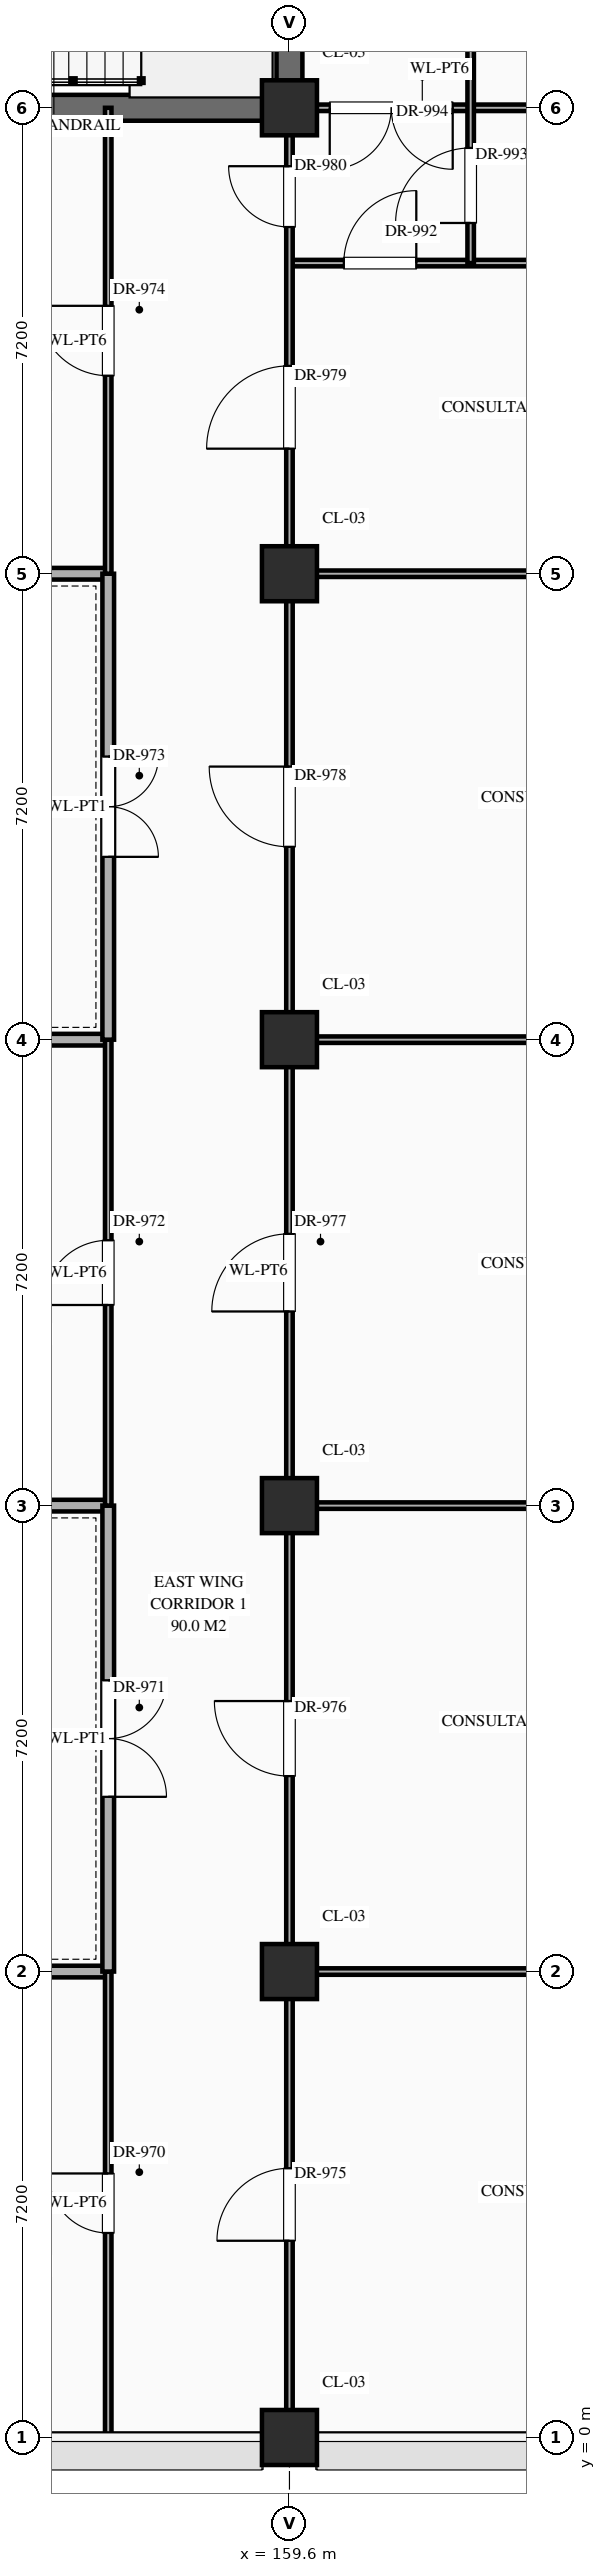
"""IFC4 building model, lengths in metres.
Left out: names, types, materials, properties, quantities, classifications, styles, units other than length and angle.
Written with IfcOpenShell. Run it as: python <this file> out.ifc"""

import sys

from ifc_helpers import new_model, si_unit, direction, frame, frame_2d, origin, origin_2d, place, context, subcontext, project, spatial, rectangle, extrude, element, fill, save


model = new_model("IFC4")
c1 = context("Model", 3, precision=1e-05, world=origin(), true_north=direction((0.0, 1.0)))
c2 = subcontext(c1, "Body", "Model", "MODEL_VIEW")
j1 = project(units=[si_unit("LENGTHUNIT", "METRE"), si_unit("PLANEANGLEUNIT", "RADIAN")], contexts=[c1])
p1 = place(None, origin())
s1 = spatial("IfcSite", under=j1, at=p1, CompositionType="ELEMENT")
p2 = place(p1, origin())
s2 = spatial("IfcBuilding", under=s1, at=p2, CompositionType="ELEMENT")
p3 = place(p2, origin())
s3 = spatial("IfcBuildingStorey", under=s2, at=p3, CompositionType="ELEMENT", Elevation=0.0)
for number, where, z_axis, x_axis in (
    (1, (159.6, 0.0, 0.0), (0.0, 0.0, 1.0), (1.0, 0.0, 0.0)),
    (2, (159.6, 7.2, 0.0), (0.0, 0.0, 1.0), (1.0, 0.0, 0.0)),
    (3, (159.6, 14.4, 0.0), (0.0, 0.0, 1.0), (1.0, 0.0, 0.0)),
    (4, (159.6, 21.6, 0.0), (0.0, 0.0, 1.0), (1.0, 0.0, 0.0)),
    (5, (159.6, 28.8, 0.0), (0.0, 0.0, 1.0), (1.0, 0.0, 0.0)),
    (6, (159.6, 36.0, 0.0), (0.0, 0.0, 1.0), (1.0, 0.0, 0.0)),
):
    element("IfcColumn", number, at=place(p3, frame(where, z_axis=z_axis, x_axis=x_axis)), inside=s3, PredefinedType="COLUMN", context=c2, shape_type="SweptSolid", body=[
        extrude(rectangle(XDim=0.85, YDim=0.85, at=origin_2d()), origin(), (0.0, 0.0, 1.0), 5.4),
    ])
p4 = place(p3, frame((151.24, 7.2, 0.0), z_axis=(0.0, 0.0, 1.0), x_axis=(1.0, 0.0, 0.0)))
e7 = element("IfcWall", 7, at=p4, inside=s3, PredefinedType="STANDARD", context=c2, shape_type="SweptSolid", body=[
    extrude(rectangle(XDim=5.56, YDim=0.18, at=frame_2d((2.78, 0.0))), origin(), (0.0, 0.0, 1.0), 4.27),
])
p5 = place(p3, frame((159.6, 7.2, 0.0), z_axis=(0.0, 0.0, 1.0), x_axis=(1.0, 0.0, 0.0)))
e8 = element("IfcWall", 8, at=p5, inside=s3, PredefinedType="STANDARD", context=c2, shape_type="SweptSolid", body=[
    extrude(rectangle(XDim=8.36, YDim=0.1, at=frame_2d((4.18, 0.0))), origin(), (0.0, 0.0, 1.0), 4.27),
])
p6 = place(p3, frame((151.24, 14.4, 0.0), z_axis=(0.0, 0.0, 1.0), x_axis=(1.0, 0.0, 0.0)))
e9 = element("IfcWall", 9, at=p6, inside=s3, PredefinedType="STANDARD", context=c2, shape_type="SweptSolid", body=[
    extrude(rectangle(XDim=5.56, YDim=0.18, at=frame_2d((2.78, 0.0))), origin(), (0.0, 0.0, 1.0), 4.27),
])
p7 = place(p3, frame((159.6, 14.4, 0.0), z_axis=(0.0, 0.0, 1.0), x_axis=(1.0, 0.0, 0.0)))
e10 = element("IfcWall", 10, at=p7, inside=s3, PredefinedType="STANDARD", context=c2, shape_type="SweptSolid", body=[
    extrude(rectangle(XDim=8.36, YDim=0.1, at=frame_2d((4.18, 0.0))), origin(), (0.0, 0.0, 1.0), 4.27),
])
p8 = place(p3, frame((151.24, 21.6, 0.0), z_axis=(0.0, 0.0, 1.0), x_axis=(1.0, 0.0, 0.0)))
e11 = element("IfcWall", 11, at=p8, inside=s3, PredefinedType="STANDARD", context=c2, shape_type="SweptSolid", body=[
    extrude(rectangle(XDim=5.56, YDim=0.18, at=frame_2d((2.78, 0.0))), origin(), (0.0, 0.0, 1.0), 4.27),
])
p9 = place(p3, frame((159.6, 21.6, 0.0), z_axis=(0.0, 0.0, 1.0), x_axis=(1.0, 0.0, 0.0)))
e12 = element("IfcWall", 12, at=p9, inside=s3, PredefinedType="STANDARD", context=c2, shape_type="SweptSolid", body=[
    extrude(rectangle(XDim=8.36, YDim=0.1, at=frame_2d((4.18, 0.0))), origin(), (0.0, 0.0, 1.0), 4.27),
])
p10 = place(p3, frame((151.24, 28.8, 0.0), z_axis=(0.0, 0.0, 1.0), x_axis=(1.0, 0.0, 0.0)))
e13 = element("IfcWall", 13, at=p10, inside=s3, PredefinedType="STANDARD", context=c2, shape_type="SweptSolid", body=[
    extrude(rectangle(XDim=5.56, YDim=0.18, at=frame_2d((2.78, 0.0))), origin(), (0.0, 0.0, 1.0), 4.27),
])
p11 = place(p3, frame((159.6, 28.8, 0.0), z_axis=(0.0, 0.0, 1.0), x_axis=(1.0, 0.0, 0.0)))
e14 = element("IfcWall", 14, at=p11, inside=s3, PredefinedType="STANDARD", context=c2, shape_type="SweptSolid", body=[
    extrude(rectangle(XDim=8.36, YDim=0.1, at=frame_2d((4.18, 0.0))), origin(), (0.0, 0.0, 1.0), 4.27),
])
p12 = place(p3, frame((159.6, 33.6, 0.0), z_axis=(0.0, 0.0, 1.0), x_axis=(1.0, 0.0, 0.0)))
e15 = element("IfcWall", 15, at=p12, inside=s3, PredefinedType="STANDARD", context=c2, shape_type="SweptSolid", body=[
    extrude(rectangle(XDim=8.36, YDim=0.1, at=frame_2d((4.18, 0.0))), origin(), (0.0, 0.0, 1.0), 5.12),
])
p13 = place(p12, frame((0.84, 0.0, 0.0)))
e16 = element("IfcOpeningElement", 16, at=p13, cuts=e15, PredefinedType="OPENING", context=c2, shape_type="SweptSolid", body=[
    extrude(rectangle(XDim=1.12, YDim=2.25, at=frame_2d((0.56, 1.125))), frame((0.0, 0.062, 0.0), z_axis=(0.0, -1.0, 0.0), x_axis=(1.0, 0.0, 0.0)), (0.0, 0.0, 1.0), 0.124),
])
p14 = place(p3, frame((151.24, 36.0, 0.0), z_axis=(0.0, 0.0, 1.0), x_axis=(1.0, 0.0, 0.0)))
e17 = element("IfcWall", 17, at=p14, inside=s3, PredefinedType="SHEAR", context=c2, shape_type="SweptSolid", body=[
    extrude(rectangle(XDim=8.36, YDim=0.4, at=frame_2d((4.18, 0.0))), origin(), (0.0, 0.0, 1.0), 5.12),
])
p15 = place(p3, frame((159.6, 36.0, 0.0), z_axis=(0.0, 0.0, 1.0), x_axis=(1.0, 0.0, 0.0)))
e18 = element("IfcWall", 18, at=p15, inside=s3, PredefinedType="STANDARD", context=c2, shape_type="SweptSolid", body=[
    extrude(rectangle(XDim=8.36, YDim=0.1, at=frame_2d((4.18, 0.0))), origin(), (0.0, 0.0, 1.0), 4.27),
])
p16 = place(p15, frame((0.623, 0.0, 0.0)))
e19 = element("IfcOpeningElement", 19, at=p16, cuts=e18, PredefinedType="OPENING", context=c2, shape_type="SweptSolid", body=[
    extrude(rectangle(XDim=1.9, YDim=2.5, at=frame_2d((0.95, 1.25))), frame((0.0, 0.062, 0.0), z_axis=(0.0, -1.0, 0.0), x_axis=(1.0, 0.0, 0.0)), (0.0, 0.0, 1.0), 0.124),
])
p17 = place(p3, frame((156.8, 0.04, 0.0), z_axis=(0.0, 0.0, 1.0), x_axis=(0.0, 1.0, 0.0)))
e20 = element("IfcWall", 20, at=p17, inside=s3, PredefinedType="STANDARD", context=c2, shape_type="SweptSolid", body=[
    extrude(rectangle(XDim=7.16, YDim=0.1, at=frame_2d((3.58, 0.0))), origin(), (0.0, 0.0, 1.0), 5.12),
])
p18 = place(p17, frame((3.12, 0.0, 0.0)))
e21 = element("IfcOpeningElement", 21, at=p18, cuts=e20, PredefinedType="OPENING", context=c2, shape_type="SweptSolid", body=[
    extrude(rectangle(XDim=0.92, YDim=2.15, at=frame_2d((0.46, 1.075))), frame((0.0, 0.062, 0.0), z_axis=(0.0, -1.0, 0.0), x_axis=(1.0, 0.0, 0.0)), (0.0, 0.0, 1.0), 0.124),
])
p19 = place(p3, frame((156.8, 7.2, 0.0), z_axis=(0.0, 0.0, 1.0), x_axis=(0.0, 1.0, 0.0)))
e22 = element("IfcWall", 22, at=p19, inside=s3, PredefinedType="STANDARD", context=c2, shape_type="SweptSolid", body=[
    extrude(rectangle(XDim=7.2, YDim=0.18, at=frame_2d((3.6, 0.0))), origin(), (0.0, 0.0, 1.0), 5.12),
])
p20 = place(p19, frame((2.7, 0.0, 0.0)))
e23 = element("IfcOpeningElement", 23, at=p20, cuts=e22, PredefinedType="OPENING", context=c2, shape_type="SweptSolid", body=[
    extrude(rectangle(XDim=1.8, YDim=2.5, at=frame_2d((0.9, 1.25))), frame((0.0, 0.102, 0.0), z_axis=(0.0, -1.0, 0.0), x_axis=(1.0, 0.0, 0.0)), (0.0, 0.0, 1.0), 0.204),
])
p21 = place(p3, frame((156.8, 14.4, 0.0), z_axis=(0.0, 0.0, 1.0), x_axis=(0.0, 1.0, 0.0)))
e24 = element("IfcWall", 24, at=p21, inside=s3, PredefinedType="STANDARD", context=c2, shape_type="SweptSolid", body=[
    extrude(rectangle(XDim=7.2, YDim=0.1, at=frame_2d((3.6, 0.0))), origin(), (0.0, 0.0, 1.0), 5.12),
])
p22 = place(p21, frame((3.1, 0.0, 0.0)))
e25 = element("IfcOpeningElement", 25, at=p22, cuts=e24, PredefinedType="OPENING", context=c2, shape_type="SweptSolid", body=[
    extrude(rectangle(XDim=1.0, YDim=2.25, at=frame_2d((0.5, 1.125))), frame((0.0, 0.062, 0.0), z_axis=(0.0, -1.0, 0.0), x_axis=(1.0, 0.0, 0.0)), (0.0, 0.0, 1.0), 0.124),
])
p23 = place(p3, frame((156.8, 21.6, 0.0), z_axis=(0.0, 0.0, 1.0), x_axis=(0.0, 1.0, 0.0)))
e26 = element("IfcWall", 26, at=p23, inside=s3, PredefinedType="STANDARD", context=c2, shape_type="SweptSolid", body=[
    extrude(rectangle(XDim=7.2, YDim=0.18, at=frame_2d((3.6, 0.0))), origin(), (0.0, 0.0, 1.0), 5.12),
])
p24 = place(p23, frame((2.825, 0.0, 0.0)))
e27 = element("IfcOpeningElement", 27, at=p24, cuts=e26, PredefinedType="OPENING", context=c2, shape_type="SweptSolid", body=[
    extrude(rectangle(XDim=1.55, YDim=2.35, at=frame_2d((0.775, 1.175))), frame((0.0, 0.102, 0.0), z_axis=(0.0, -1.0, 0.0), x_axis=(1.0, 0.0, 0.0)), (0.0, 0.0, 1.0), 0.204),
])
p25 = place(p3, frame((156.8, 28.8, 0.0), z_axis=(0.0, 0.0, 1.0), x_axis=(0.0, 1.0, 0.0)))
e28 = element("IfcWall", 28, at=p25, inside=s3, PredefinedType="STANDARD", context=c2, shape_type="SweptSolid", body=[
    extrude(rectangle(XDim=7.2, YDim=0.1, at=frame_2d((3.6, 0.0))), origin(), (0.0, 0.0, 1.0), 5.12),
])
p26 = place(p25, frame((3.06, 0.0, 0.0)))
e29 = element("IfcOpeningElement", 29, at=p26, cuts=e28, PredefinedType="OPENING", context=c2, shape_type="SweptSolid", body=[
    extrude(rectangle(XDim=1.08, YDim=2.25, at=frame_2d((0.54, 1.125))), frame((0.0, 0.062, 0.0), z_axis=(0.0, -1.0, 0.0), x_axis=(1.0, 0.0, 0.0)), (0.0, 0.0, 1.0), 0.124),
])
p27 = place(p3, frame((159.6, 0.04, 0.0), z_axis=(0.0, 0.0, 1.0), x_axis=(0.0, 1.0, 0.0)))
e30 = element("IfcWall", 30, at=p27, inside=s3, PredefinedType="STANDARD", context=c2, shape_type="SweptSolid", body=[
    extrude(rectangle(XDim=35.96, YDim=0.1, at=frame_2d((17.98, 0.0))), origin(), (0.0, 0.0, 1.0), 4.37),
])
p28 = place(p27, frame((3.0, 0.0, 0.0)))
e31 = element("IfcOpeningElement", 31, at=p28, cuts=e30, PredefinedType="OPENING", context=c2, shape_type="SweptSolid", body=[
    extrude(rectangle(XDim=1.12, YDim=2.25, at=frame_2d((0.56, 1.125))), frame((0.0, 0.062, 0.0), z_axis=(0.0, -1.0, 0.0), x_axis=(1.0, 0.0, 0.0)), (0.0, 0.0, 1.0), 0.124),
])
p29 = place(p27, frame((10.18, 0.0, 0.0)))
e32 = element("IfcOpeningElement", 32, at=p29, cuts=e30, PredefinedType="OPENING", context=c2, shape_type="SweptSolid", body=[
    extrude(rectangle(XDim=1.16, YDim=2.3, at=frame_2d((0.58, 1.15))), frame((0.0, 0.062, 0.0), z_axis=(0.0, -1.0, 0.0), x_axis=(1.0, 0.0, 0.0)), (0.0, 0.0, 1.0), 0.124),
])
p30 = place(p27, frame((17.36, 0.0, 0.0)))
e33 = element("IfcOpeningElement", 33, at=p30, cuts=e30, PredefinedType="OPENING", context=c2, shape_type="SweptSolid", body=[
    extrude(rectangle(XDim=1.2, YDim=2.35, at=frame_2d((0.6, 1.175))), frame((0.0, 0.062, 0.0), z_axis=(0.0, -1.0, 0.0), x_axis=(1.0, 0.0, 0.0)), (0.0, 0.0, 1.0), 0.124),
])
p31 = place(p27, frame((24.54, 0.0, 0.0)))
e34 = element("IfcOpeningElement", 34, at=p31, cuts=e30, PredefinedType="OPENING", context=c2, shape_type="SweptSolid", body=[
    extrude(rectangle(XDim=1.24, YDim=2.3, at=frame_2d((0.62, 1.15))), frame((0.0, 0.062, 0.0), z_axis=(0.0, -1.0, 0.0), x_axis=(1.0, 0.0, 0.0)), (0.0, 0.0, 1.0), 0.124),
])
p32 = place(p27, frame((30.692, 0.0, 0.0)))
e35 = element("IfcOpeningElement", 35, at=p32, cuts=e30, PredefinedType="OPENING", context=c2, shape_type="SweptSolid", body=[
    extrude(rectangle(XDim=1.28, YDim=2.35, at=frame_2d((0.64, 1.175))), frame((0.0, 0.062, 0.0), z_axis=(0.0, -1.0, 0.0), x_axis=(1.0, 0.0, 0.0)), (0.0, 0.0, 1.0), 0.124),
])
p33 = place(p27, frame((34.117, 0.0, 0.0)))
e36 = element("IfcOpeningElement", 36, at=p33, cuts=e30, PredefinedType="OPENING", context=c2, shape_type="SweptSolid", body=[
    extrude(rectangle(XDim=0.94, YDim=2.3, at=frame_2d((0.47, 1.15))), frame((0.0, 0.062, 0.0), z_axis=(0.0, -1.0, 0.0), x_axis=(1.0, 0.0, 0.0)), (0.0, 0.0, 1.0), 0.124),
])
p34 = place(p3, frame((159.6, 36.0, 0.0), z_axis=(0.0, 0.0, 1.0), x_axis=(0.0, 1.0, 0.0)))
e37 = element("IfcWall", 37, at=p34, inside=s3, PredefinedType="SHEAR", context=c2, shape_type="SweptSolid", body=[
    extrude(rectangle(XDim=4.8, YDim=0.4, at=frame_2d((2.4, 0.0))), origin(), (0.0, 0.0, 1.0), 5.12),
])
p35 = place(p3, frame((162.4, 33.6, 0.0), z_axis=(0.0, 0.0, 1.0), x_axis=(0.0, 1.0, 0.0)))
e38 = element("IfcWall", 38, at=p35, inside=s3, PredefinedType="STANDARD", context=c2, shape_type="SweptSolid", body=[
    extrude(rectangle(XDim=12.0, YDim=0.1, at=frame_2d((6.0, 0.0))), origin(), (0.0, 0.0, 1.0), 5.12),
])
p36 = place(p35, frame((0.62, 0.0, 0.0)))
e39 = element("IfcOpeningElement", 39, at=p36, cuts=e38, PredefinedType="OPENING", context=c2, shape_type="SweptSolid", body=[
    extrude(rectangle(XDim=1.16, YDim=2.3, at=frame_2d((0.58, 1.15))), frame((0.0, 0.062, 0.0), z_axis=(0.0, -1.0, 0.0), x_axis=(1.0, 0.0, 0.0)), (0.0, 0.0, 1.0), 0.124),
])
p37 = place(p35, frame((5.38, 0.0, 0.0)))
e40 = element("IfcOpeningElement", 40, at=p37, cuts=e38, PredefinedType="OPENING", context=c2, shape_type="SweptSolid", body=[
    extrude(rectangle(XDim=1.24, YDim=2.3, at=frame_2d((0.62, 1.15))), frame((0.0, 0.062, 0.0), z_axis=(0.0, -1.0, 0.0), x_axis=(1.0, 0.0, 0.0)), (0.0, 0.0, 1.0), 0.124),
])
p38 = place(p35, frame((10.33, 0.0, 0.0)))
e41 = element("IfcOpeningElement", 41, at=p38, cuts=e38, PredefinedType="OPENING", context=c2, shape_type="SweptSolid", body=[
    extrude(rectangle(XDim=0.94, YDim=2.3, at=frame_2d((0.47, 1.15))), frame((0.0, 0.062, 0.0), z_axis=(0.0, -1.0, 0.0), x_axis=(1.0, 0.0, 0.0)), (0.0, 0.0, 1.0), 0.124),
])
p39 = place(p18, origin())
e42 = element("IfcDoor", 42, at=p39, inside=s3, OperationType="SINGLE_SWING_RIGHT", PredefinedType="DOOR", context=c2, shape_type="SweptSolid", body=[
    extrude(rectangle(XDim=0.92, YDim=2.15, at=frame_2d((0.46, 1.075))), frame((0.0, 0.025, 0.0), z_axis=(0.0, -1.0, 0.0), x_axis=(1.0, 0.0, 0.0)), (0.0, 0.0, 1.0), 0.05),
])
fill(e21, e42)
p40 = place(p20, frame((1.8, 0.0, 0.0), z_axis=(0.0, 0.0, 1.0), x_axis=(-1.0, 0.0, 0.0)))
e43 = element("IfcDoor", 43, at=p40, inside=s3, OperationType="DOUBLE_DOOR_SINGLE_SWING", PredefinedType="DOOR", context=c2, shape_type="SweptSolid", body=[
    extrude(rectangle(XDim=1.8, YDim=2.5, at=frame_2d((0.9, 1.25))), frame((0.0, 0.025, 0.0), z_axis=(0.0, -1.0, 0.0), x_axis=(1.0, 0.0, 0.0)), (0.0, 0.0, 1.0), 0.05),
])
fill(e23, e43)
p41 = place(p22, origin())
e44 = element("IfcDoor", 44, at=p41, inside=s3, OperationType="SINGLE_SWING_LEFT", PredefinedType="DOOR", context=c2, shape_type="SweptSolid", body=[
    extrude(rectangle(XDim=1.0, YDim=2.25, at=frame_2d((0.5, 1.125))), frame((0.0, 0.025, 0.0), z_axis=(0.0, -1.0, 0.0), x_axis=(1.0, 0.0, 0.0)), (0.0, 0.0, 1.0), 0.05),
])
fill(e25, e44)
p42 = place(p24, frame((1.55, 0.0, 0.0), z_axis=(0.0, 0.0, 1.0), x_axis=(-1.0, 0.0, 0.0)))
e45 = element("IfcDoor", 45, at=p42, inside=s3, OperationType="DOUBLE_DOOR_SINGLE_SWING", PredefinedType="DOOR", context=c2, shape_type="SweptSolid", body=[
    extrude(rectangle(XDim=1.55, YDim=2.35, at=frame_2d((0.775, 1.175))), frame((0.0, 0.025, 0.0), z_axis=(0.0, -1.0, 0.0), x_axis=(1.0, 0.0, 0.0)), (0.0, 0.0, 1.0), 0.05),
])
fill(e27, e45)
p43 = place(p26, origin())
e46 = element("IfcDoor", 46, at=p43, inside=s3, OperationType="SINGLE_SWING_RIGHT", PredefinedType="DOOR", context=c2, shape_type="SweptSolid", body=[
    extrude(rectangle(XDim=1.08, YDim=2.25, at=frame_2d((0.54, 1.125))), frame((0.0, 0.025, 0.0), z_axis=(0.0, -1.0, 0.0), x_axis=(1.0, 0.0, 0.0)), (0.0, 0.0, 1.0), 0.05),
])
fill(e29, e46)
p44 = place(p28, origin())
e47 = element("IfcDoor", 47, at=p44, inside=s3, OperationType="SINGLE_SWING_LEFT", PredefinedType="DOOR", context=c2, shape_type="SweptSolid", body=[
    extrude(rectangle(XDim=1.12, YDim=2.25, at=frame_2d((0.56, 1.125))), frame((0.0, 0.025, 0.0), z_axis=(0.0, -1.0, 0.0), x_axis=(1.0, 0.0, 0.0)), (0.0, 0.0, 1.0), 0.05),
])
fill(e31, e47)
p45 = place(p29, origin())
e48 = element("IfcDoor", 48, at=p45, inside=s3, OperationType="SINGLE_SWING_RIGHT", PredefinedType="DOOR", context=c2, shape_type="SweptSolid", body=[
    extrude(rectangle(XDim=1.16, YDim=2.3, at=frame_2d((0.58, 1.15))), frame((0.0, 0.025, 0.0), z_axis=(0.0, -1.0, 0.0), x_axis=(1.0, 0.0, 0.0)), (0.0, 0.0, 1.0), 0.05),
])
fill(e32, e48)
p46 = place(p30, origin())
e49 = element("IfcDoor", 49, at=p46, inside=s3, OperationType="SINGLE_SWING_LEFT", PredefinedType="DOOR", context=c2, shape_type="SweptSolid", body=[
    extrude(rectangle(XDim=1.2, YDim=2.35, at=frame_2d((0.6, 1.175))), frame((0.0, 0.025, 0.0), z_axis=(0.0, -1.0, 0.0), x_axis=(1.0, 0.0, 0.0)), (0.0, 0.0, 1.0), 0.05),
])
fill(e33, e49)
p47 = place(p31, origin())
e50 = element("IfcDoor", 50, at=p47, inside=s3, OperationType="SINGLE_SWING_RIGHT", PredefinedType="DOOR", context=c2, shape_type="SweptSolid", body=[
    extrude(rectangle(XDim=1.24, YDim=2.3, at=frame_2d((0.62, 1.15))), frame((0.0, 0.025, 0.0), z_axis=(0.0, -1.0, 0.0), x_axis=(1.0, 0.0, 0.0)), (0.0, 0.0, 1.0), 0.05),
])
fill(e34, e50)
p48 = place(p32, origin())
e51 = element("IfcDoor", 51, at=p48, inside=s3, OperationType="SINGLE_SWING_LEFT", PredefinedType="DOOR", context=c2, shape_type="SweptSolid", body=[
    extrude(rectangle(XDim=1.28, YDim=2.35, at=frame_2d((0.64, 1.175))), frame((0.0, 0.025, 0.0), z_axis=(0.0, -1.0, 0.0), x_axis=(1.0, 0.0, 0.0)), (0.0, 0.0, 1.0), 0.05),
])
fill(e35, e51)
p49 = place(p33, origin())
e52 = element("IfcDoor", 52, at=p49, inside=s3, OperationType="SINGLE_SWING_RIGHT", PredefinedType="DOOR", context=c2, shape_type="SweptSolid", body=[
    extrude(rectangle(XDim=0.94, YDim=2.3, at=frame_2d((0.47, 1.15))), frame((0.0, 0.025, 0.0), z_axis=(0.0, -1.0, 0.0), x_axis=(1.0, 0.0, 0.0)), (0.0, 0.0, 1.0), 0.05),
])
fill(e36, e52)
p50 = place(p13, origin())
e53 = element("IfcDoor", 53, at=p50, inside=s3, OperationType="SINGLE_SWING_RIGHT", PredefinedType="DOOR", context=c2, shape_type="SweptSolid", body=[
    extrude(rectangle(XDim=1.12, YDim=2.25, at=frame_2d((0.56, 1.125))), frame((0.0, 0.025, 0.0), z_axis=(0.0, -1.0, 0.0), x_axis=(1.0, 0.0, 0.0)), (0.0, 0.0, 1.0), 0.05),
])
fill(e16, e53)
p51 = place(p36, origin())
e54 = element("IfcDoor", 54, at=p51, inside=s3, OperationType="SINGLE_SWING_LEFT", PredefinedType="DOOR", context=c2, shape_type="SweptSolid", body=[
    extrude(rectangle(XDim=1.16, YDim=2.3, at=frame_2d((0.58, 1.15))), frame((0.0, 0.025, 0.0), z_axis=(0.0, -1.0, 0.0), x_axis=(1.0, 0.0, 0.0)), (0.0, 0.0, 1.0), 0.05),
])
fill(e39, e54)
p52 = place(p16, frame((1.9, 0.0, 0.0), z_axis=(0.0, 0.0, 1.0), x_axis=(-1.0, 0.0, 0.0)))
e55 = element("IfcDoor", 55, at=p52, inside=s3, OperationType="DOUBLE_DOOR_SINGLE_SWING", PredefinedType="DOOR", context=c2, shape_type="SweptSolid", body=[
    extrude(rectangle(XDim=1.9, YDim=2.5, at=frame_2d((0.95, 1.25))), frame((0.0, 0.025, 0.0), z_axis=(0.0, -1.0, 0.0), x_axis=(1.0, 0.0, 0.0)), (0.0, 0.0, 1.0), 0.05),
])
fill(e19, e55)
save(model, sys.argv[1])
